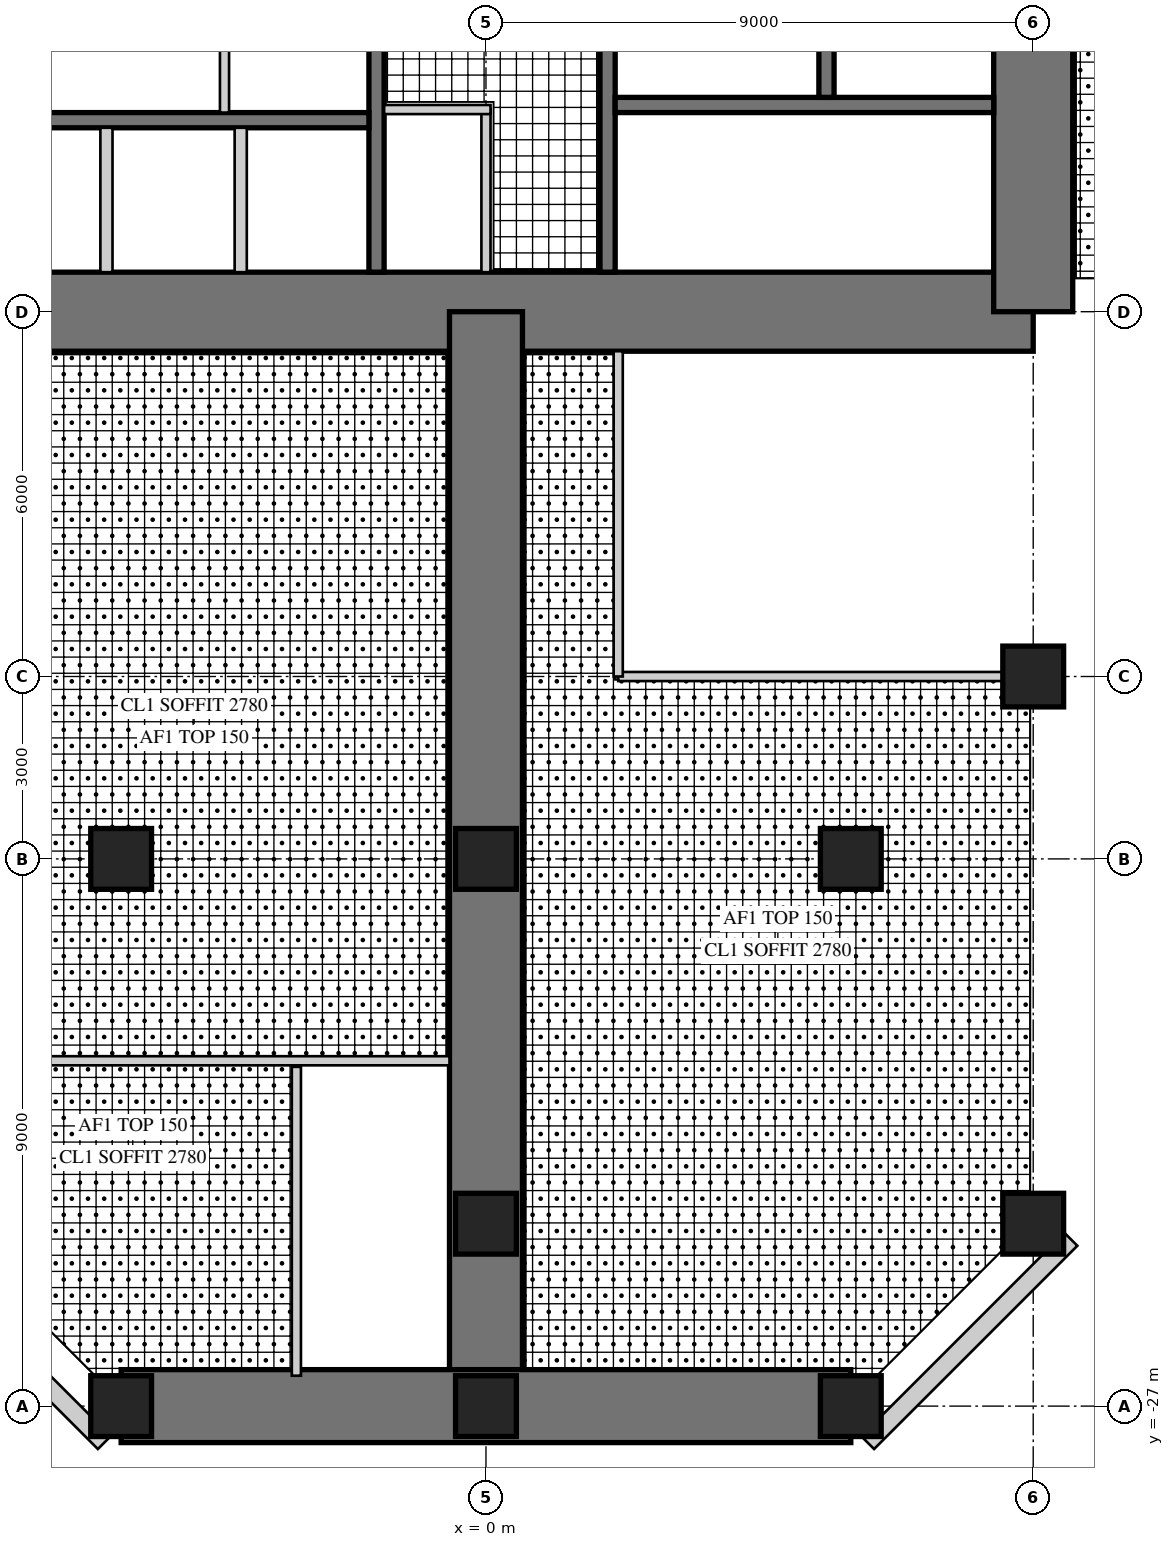
"""IFC4 building model, lengths in metres.
Left out: names, types, materials, properties, quantities, classifications, styles, units other than length and angle.
Written with IfcOpenShell. Run it as: python <this file> out.ifc"""

import sys

from ifc_helpers import new_model, si_unit, direction, frame, frame_2d, origin, origin_2d, place, context, subcontext, project, spatial, rectangle, hollow_rectangle, extrude, element, fill, save


model = new_model("IFC4")
c1 = context("Model", 3, precision=1e-05, world=origin(), true_north=direction((0.0, 1.0)))
c2 = subcontext(c1, "Body", "Model", "MODEL_VIEW")
j1 = project(units=[si_unit("LENGTHUNIT", "METRE"), si_unit("PLANEANGLEUNIT", "RADIAN")], contexts=[c1])
p1 = place(None, origin())
s1 = spatial("IfcSite", under=j1, at=p1, CompositionType="ELEMENT")
p2 = place(p1, origin())
s2 = spatial("IfcBuilding", under=s1, at=p2, CompositionType="ELEMENT")
p3 = place(p2, frame((0.0, 0.0, 104.5)))
s3 = spatial("IfcBuildingStorey", under=s2, at=p3, CompositionType="ELEMENT", Elevation=104.5)
p4 = place(p3, frame((-9.0, -9.0, 0.0), z_axis=(0.0, 0.0, 1.0), x_axis=(1.0, 0.0, 0.0)))
e1 = element("IfcWall", 1, at=p4, inside=s3, PredefinedType="SHEAR", context=c2, shape_type="SweptSolid", body=[
    extrude(rectangle(XDim=18.0, YDim=1.3, at=frame_2d((9.0, 0.0))), origin(), (0.0, 0.0, 1.0), 4.0),
])
p5 = place(p4, frame((9.8, 0.0, 0.0)))
e2 = element("IfcOpeningElement", 2, at=p5, cuts=e1, PredefinedType="OPENING", context=c2, shape_type="SweptSolid", body=[
    extrude(rectangle(XDim=1.0, YDim=2.4, at=frame_2d((0.5, 1.2))), frame((0.0, 0.66, 0.0), z_axis=(0.0, -1.0, 0.0), x_axis=(1.0, 0.0, 0.0)), (0.0, 0.0, 1.0), 1.32),
])
p6 = place(p3, frame((9.0, -9.0, 0.0), z_axis=(0.0, 0.0, 1.0), x_axis=(0.0, 1.0, 0.0)))
e3 = element("IfcWall", 3, at=p6, inside=s3, PredefinedType="SHEAR", context=c2, shape_type="SweptSolid", body=[
    extrude(rectangle(XDim=18.0, YDim=1.3, at=frame_2d((9.0, 0.0))), origin(), (0.0, 0.0, 1.0), 4.0),
])
p7 = place(p6, frame((9.8, 0.0, 0.0)))
e4 = element("IfcOpeningElement", 4, at=p7, cuts=e3, PredefinedType="OPENING", context=c2, shape_type="SweptSolid", body=[
    extrude(rectangle(XDim=1.0, YDim=2.4, at=frame_2d((0.5, 1.2))), frame((0.0, 0.66, 0.0), z_axis=(0.0, -1.0, 0.0), x_axis=(1.0, 0.0, 0.0)), (0.0, 0.0, 1.0), 1.32),
])
p8 = place(p3, frame((-1.8, -1.875, 0.0), z_axis=(0.0, 0.0, 1.0), x_axis=(0.0, -1.0, 0.0)))
e5 = element("IfcWall", 5, at=p8, inside=s3, PredefinedType="SHEAR", context=c2, shape_type="SweptSolid", body=[
    extrude(rectangle(XDim=6.475, YDim=0.25, at=frame_2d((3.238, 0.0))), origin(), (0.0, 0.0, 1.0), 4.0),
])
p9 = place(p8, frame((1.875, 0.0, 0.0)))
e6 = element("IfcOpeningElement", 6, at=p9, cuts=e5, PredefinedType="OPENING", context=c2, shape_type="SweptSolid", body=[
    extrude(rectangle(XDim=1.6, YDim=2.4, at=frame_2d((0.8, 1.2))), frame((0.0, 0.135, 0.0), z_axis=(0.0, -1.0, 0.0), x_axis=(1.0, 0.0, 0.0)), (0.0, 0.0, 1.0), 0.27),
])
p10 = place(p3, frame((-1.925, -5.85, 0.0), z_axis=(0.0, 0.0, 1.0), x_axis=(-1.0, 0.0, 0.0)))
e7 = element("IfcWall", 7, at=p10, inside=s3, PredefinedType="SHEAR", context=c2, shape_type="SweptSolid", body=[
    extrude(rectangle(XDim=6.425, YDim=0.25, at=frame_2d((3.212, 0.0))), origin(), (0.0, 0.0, 1.0), 4.0),
])
for number, where, z_axis, x_axis in (
    (8, (-4.033, -5.975, 0.0), (0.0, 0.0, 1.0), (0.0, -1.0, 0.0)),
    (9, (-6.242, -5.975, 0.0), (0.0, 0.0, 1.0), (0.0, -1.0, 0.0)),
):
    element("IfcWall", number, at=place(p3, frame(where, z_axis=z_axis, x_axis=x_axis)), inside=s3, PredefinedType="PARTITIONING", context=c2, shape_type="SweptSolid", body=[
        extrude(rectangle(XDim=2.375, YDim=0.2, at=frame_2d((1.188, 0.0))), origin(), (0.0, 0.0, 1.0), 4.0),
    ])
p11 = place(p3, frame((2.0, -1.675, 0.0), z_axis=(0.0, 0.0, 1.0), x_axis=(0.0, -1.0, 0.0)))
e10 = element("IfcWall", 10, at=p11, inside=s3, PredefinedType="SHEAR", context=c2, shape_type="SweptSolid", body=[
    extrude(rectangle(XDim=6.675, YDim=0.25, at=frame_2d((3.337, 0.0))), origin(), (0.0, 0.0, 1.0), 4.0),
])
p12 = place(p11, frame((0.725, 0.0, 0.0)))
e11 = element("IfcOpeningElement", 11, at=p12, cuts=e10, PredefinedType="OPENING", context=c2, shape_type="SweptSolid", body=[
    extrude(rectangle(XDim=1.0, YDim=2.1, at=frame_2d((0.5, 1.05))), frame((0.0, 0.135, 0.0), z_axis=(0.0, -1.0, 0.0), x_axis=(1.0, 0.0, 0.0)), (0.0, 0.0, 1.0), 0.27),
])
p13 = place(p3, frame((2.125, -5.6, 0.0), z_axis=(0.0, 0.0, 1.0), x_axis=(1.0, 0.0, 0.0)))
e12 = element("IfcWall", 12, at=p13, inside=s3, PredefinedType="SHEAR", context=c2, shape_type="SweptSolid", body=[
    extrude(rectangle(XDim=6.225, YDim=0.25, at=frame_2d((3.113, 0.0))), origin(), (0.0, 0.0, 1.0), 4.0),
])
p14 = place(p13, frame((0.175, 0.0, 0.0)))
e13 = element("IfcOpeningElement", 13, at=p14, cuts=e12, PredefinedType="OPENING", context=c2, shape_type="SweptSolid", body=[
    extrude(rectangle(XDim=1.0, YDim=2.1, at=frame_2d((0.5, 1.05))), frame((0.0, 0.135, 0.0), z_axis=(0.0, -1.0, 0.0), x_axis=(1.0, 0.0, 0.0)), (0.0, 0.0, 1.0), 0.27),
])
p15 = place(p3, frame((5.6, -1.925, 0.0), z_axis=(0.0, 0.0, 1.0), x_axis=(0.0, -1.0, 0.0)))
e14 = element("IfcWall", 14, at=p15, inside=s3, PredefinedType="SHEAR", context=c2, shape_type="SweptSolid", body=[
    extrude(rectangle(XDim=3.55, YDim=0.25, at=frame_2d((1.775, 0.0))), origin(), (0.0, 0.0, 1.0), 4.0),
])
p16 = place(p15, frame((1.525, 0.0, 0.0)))
e15 = element("IfcOpeningElement", 15, at=p16, cuts=e14, PredefinedType="OPENING", context=c2, shape_type="SweptSolid", body=[
    extrude(rectangle(XDim=1.1, YDim=2.2, at=frame_2d((0.55, 1.1))), frame((0.0, 0.135, 0.0), z_axis=(0.0, -1.0, 0.0), x_axis=(1.0, 0.0, 0.0)), (0.0, 0.0, 1.0), 0.27),
])
p17 = place(p15, frame((0.075, 0.0, 0.0)))
e16 = element("IfcOpeningElement", 16, at=p17, cuts=e14, PredefinedType="OPENING", context=c2, shape_type="SweptSolid", body=[
    extrude(rectangle(XDim=0.8, YDim=2.1, at=frame_2d((0.4, 1.05))), frame((0.0, 0.135, 0.0), z_axis=(0.0, -1.0, 0.0), x_axis=(1.0, 0.0, 0.0)), (0.0, 0.0, 1.0), 0.27),
])
p18 = place(p3, frame((0.0, -9.0, 0.0), z_axis=(0.0, 0.0, 1.0), x_axis=(0.0, -1.0, 0.0)))
e17 = element("IfcWall", 17, at=p18, inside=s3, PredefinedType="SHEAR", context=c2, shape_type="SweptSolid", body=[
    extrude(rectangle(XDim=18.0, YDim=1.2, at=frame_2d((9.0, 0.0))), origin(), (0.0, 0.0, 1.0), 4.0),
])
p19 = place(p18, frame((9.8, 0.0, 0.0)))
e18 = element("IfcOpeningElement", 18, at=p19, cuts=e17, PredefinedType="OPENING", context=c2, shape_type="SweptSolid", body=[
    extrude(rectangle(XDim=1.0, YDim=2.2, at=frame_2d((0.5, 1.1))), frame((0.0, 0.61, 0.0), z_axis=(0.0, -1.0, 0.0), x_axis=(1.0, 0.0, 0.0)), (0.0, 0.0, 1.0), 1.22),
])
p20 = place(p3, frame((-6.0, -27.0, 0.0), z_axis=(0.0, 0.0, 1.0), x_axis=(1.0, 0.0, 0.0)))
e19 = element("IfcWall", 19, at=p20, inside=s3, PredefinedType="SHEAR", context=c2, shape_type="SweptSolid", body=[
    extrude(rectangle(XDim=12.0, YDim=1.2, at=frame_2d((6.0, 0.0))), origin(), (0.0, 0.0, 1.0), 4.0),
])
p21 = place(p20, frame((1.55, 0.0, 0.6)))
e20 = element("IfcOpeningElement", 20, at=p21, cuts=e19, PredefinedType="OPENING", context=c2, shape_type="SweptSolid", body=[
    extrude(rectangle(XDim=3.0, YDim=2.4, at=frame_2d((1.5, 1.2))), frame((0.0, 0.61, 0.0), z_axis=(0.0, -1.0, 0.0), x_axis=(1.0, 0.0, 0.0)), (0.0, 0.0, 1.0), 1.22),
])
p22 = place(p20, frame((7.45, 0.0, 0.6)))
e21 = element("IfcOpeningElement", 21, at=p22, cuts=e19, PredefinedType="OPENING", context=c2, shape_type="SweptSolid", body=[
    extrude(rectangle(XDim=3.0, YDim=2.4, at=frame_2d((1.5, 1.2))), frame((0.0, 0.61, 0.0), z_axis=(0.0, -1.0, 0.0), x_axis=(1.0, 0.0, 0.0)), (0.0, 0.0, 1.0), 1.22),
])
for number, where, z_axis, x_axis in (
    (22, (9.0, -15.0, 0.0), (0.0, 0.0, 1.0), (1.0, 0.0, 0.0)),
    (23, (9.0, -24.0, 0.0), (0.0, 0.0, 1.0), (1.0, 0.0, 0.0)),
    (24, (-6.0, -27.0, 0.0), (0.0, 0.0, 1.0), (1.0, 0.0, 0.0)),
    (25, (0.0, -27.0, 0.0), (0.0, 0.0, 1.0), (1.0, 0.0, 0.0)),
    (26, (6.0, -27.0, 0.0), (0.0, 0.0, 1.0), (1.0, 0.0, 0.0)),
    (27, (-6.0, -18.0, 0.0), (0.0, 0.0, 1.0), (1.0, 0.0, 0.0)),
    (28, (0.0, -18.0, 0.0), (0.0, 0.0, 1.0), (1.0, 0.0, 0.0)),
    (29, (6.0, -18.0, 0.0), (0.0, 0.0, 1.0), (1.0, 0.0, 0.0)),
    (30, (0.0, -24.0, 0.0), (0.0, 0.0, 1.0), (1.0, 0.0, 0.0)),
):
    element("IfcColumn", number, at=place(p3, frame(where, z_axis=z_axis, x_axis=x_axis)), inside=s3, PredefinedType="COLUMN", context=c2, shape_type="SweptSolid", body=[
        extrude(rectangle(XDim=1.0, YDim=1.0, at=origin_2d()), origin(), (0.0, 0.0, 1.0), 4.0),
    ])
p23 = place(p3, frame((-9.62, -24.257, 0.0), z_axis=(0.0, 0.0, 1.0), x_axis=(0.707106781187, -0.707106781187, 0.0)))
e31 = element("IfcWall", 31, at=p23, inside=s3, PredefinedType="SOLIDWALL", context=c2, shape_type="SweptSolid", body=[
    extrude(rectangle(XDim=4.728, YDim=0.3, at=frame_2d((2.364, 0.0))), origin(), (0.0, 0.0, 1.0), 3.8),
])
p24 = place(p23, frame((1.914, 0.0, 0.3)))
e32 = element("IfcOpeningElement", 32, at=p24, cuts=e31, PredefinedType="OPENING", context=c2, shape_type="SweptSolid", body=[
    extrude(rectangle(XDim=0.9, YDim=2.4, at=frame_2d((0.45, 1.2))), frame((0.0, 0.16, 0.0), z_axis=(0.0, -1.0, 0.0), x_axis=(1.0, 0.0, 0.0)), (0.0, 0.0, 1.0), 0.32),
])
p25 = place(p3, frame((6.277, -27.6, 0.0), z_axis=(0.0, 0.0, 1.0), x_axis=(0.707106781187, 0.707106781187, 0.0)))
e33 = element("IfcWall", 33, at=p25, inside=s3, PredefinedType="SOLIDWALL", context=c2, shape_type="SweptSolid", body=[
    extrude(rectangle(XDim=4.728, YDim=0.3, at=frame_2d((2.364, 0.0))), origin(), (0.0, 0.0, 1.0), 3.8),
])
p26 = place(p25, frame((1.914, 0.0, 0.3)))
e34 = element("IfcOpeningElement", 34, at=p26, cuts=e33, PredefinedType="OPENING", context=c2, shape_type="SweptSolid", body=[
    extrude(rectangle(XDim=0.9, YDim=2.4, at=frame_2d((0.45, 1.2))), frame((0.0, 0.16, 0.0), z_axis=(0.0, -1.0, 0.0), x_axis=(1.0, 0.0, 0.0)), (0.0, 0.0, 1.0), 0.32),
])
p27 = place(p3, frame((0.0, -5.675, 0.0), z_axis=(0.0, 0.0, 1.0), x_axis=(0.0, -1.0, 0.0)))
e35 = element("IfcWall", 35, at=p27, inside=s3, PredefinedType="PARTITIONING", context=c2, shape_type="SweptSolid", body=[
    extrude(rectangle(XDim=2.675, YDim=0.15, at=frame_2d((1.337, 0.0))), origin(), (0.0, 0.0, 1.0), 3.8),
])
p28 = place(p27, frame((0.4, 0.0, 0.0)))
e36 = element("IfcOpeningElement", 36, at=p28, cuts=e35, PredefinedType="OPENING", context=c2, shape_type="SweptSolid", body=[
    extrude(rectangle(XDim=1.0, YDim=2.1, at=frame_2d((0.5, 1.05))), frame((0.0, 0.085, 0.0), z_axis=(0.0, -1.0, 0.0), x_axis=(1.0, 0.0, 0.0)), (0.0, 0.0, 1.0), 0.17),
])
p29 = place(p3, frame((-1.675, -5.675, 0.0), z_axis=(0.0, 0.0, 1.0), x_axis=(1.0, 0.0, 0.0)))
e37 = element("IfcWall", 37, at=p29, inside=s3, PredefinedType="PARTITIONING", context=c2, shape_type="SweptSolid", body=[
    extrude(rectangle(XDim=1.75, YDim=0.15, at=frame_2d((0.875, 0.0))), origin(), (0.0, 0.0, 1.0), 3.8),
])
p30 = place(p3, frame((-4.3, -3.375, 0.0), z_axis=(0.0, 0.0, 1.0), x_axis=(0.0, -1.0, 0.0)))
e38 = element("IfcWall", 38, at=p30, inside=s3, PredefinedType="PARTITIONING", context=c2, shape_type="SweptSolid", body=[
    extrude(rectangle(XDim=2.35, YDim=0.15, at=frame_2d((1.175, 0.0))), origin(), (0.0, 0.0, 1.0), 3.8),
])
p31 = place(p30, frame((0.45, 0.0, 0.0)))
e39 = element("IfcOpeningElement", 39, at=p31, cuts=e38, PredefinedType="OPENING", context=c2, shape_type="SweptSolid", body=[
    extrude(rectangle(XDim=1.0, YDim=2.1, at=frame_2d((0.5, 1.05))), frame((0.0, 0.085, 0.0), z_axis=(0.0, -1.0, 0.0), x_axis=(1.0, 0.0, 0.0)), (0.0, 0.0, 1.0), 0.17),
])
p32 = place(p3, frame((2.175, -15.0, 0.0), z_axis=(0.0, 0.0, 1.0), x_axis=(1.0, 0.0, 0.0)))
e40 = element("IfcWall", 40, at=p32, inside=s3, PredefinedType="PARTITIONING", context=c2, shape_type="SweptSolid", body=[
    extrude(rectangle(XDim=6.325, YDim=0.15, at=frame_2d((3.163, 0.0))), origin(), (0.0, 0.0, 1.0), 3.0),
])
p33 = place(p32, frame((2.663, 0.0, 0.0)))
e41 = element("IfcOpeningElement", 41, at=p33, cuts=e40, PredefinedType="OPENING", context=c2, shape_type="SweptSolid", body=[
    extrude(rectangle(XDim=1.0, YDim=2.1, at=frame_2d((0.5, 1.05))), frame((0.0, 0.085, 0.0), z_axis=(0.0, -1.0, 0.0), x_axis=(1.0, 0.0, 0.0)), (0.0, 0.0, 1.0), 0.17),
])
p34 = place(p3, frame((2.175, -9.65, 0.0), z_axis=(0.0, 0.0, 1.0), x_axis=(0.0, -1.0, 0.0)))
e42 = element("IfcWall", 42, at=p34, inside=s3, PredefinedType="PARTITIONING", context=c2, shape_type="SweptSolid", body=[
    extrude(rectangle(XDim=5.35, YDim=0.15, at=frame_2d((2.675, 0.0))), origin(), (0.0, 0.0, 1.0), 3.8),
])
p35 = place(p3, frame((-3.118, -21.42, 0.0), z_axis=(0.0, 0.0, 1.0), x_axis=(0.0, -1.0, 0.0)))
e43 = element("IfcWall", 43, at=p35, inside=s3, PredefinedType="PARTITIONING", context=c2, shape_type="SweptSolid", body=[
    extrude(rectangle(XDim=5.08, YDim=0.15, at=frame_2d((2.54, 0.0))), origin(), (0.0, 0.0, 1.0), 3.8),
])
p36 = place(p3, frame((-9.58, -21.32, 0.0), z_axis=(0.0, 0.0, 1.0), x_axis=(1.0, 0.0, 0.0)))
e44 = element("IfcWall", 44, at=p36, inside=s3, PredefinedType="PARTITIONING", context=c2, shape_type="SweptSolid", body=[
    extrude(rectangle(XDim=8.98, YDim=0.15, at=frame_2d((4.49, 0.0))), origin(), (0.0, 0.0, 1.0), 3.8),
])
p37 = place(p36, frame((4.987, 0.0, 0.0)))
e45 = element("IfcOpeningElement", 45, at=p37, cuts=e44, PredefinedType="OPENING", context=c2, shape_type="SweptSolid", body=[
    extrude(rectangle(XDim=1.0, YDim=2.2, at=frame_2d((0.5, 1.1))), frame((0.0, 0.085, 0.0), z_axis=(0.0, -1.0, 0.0), x_axis=(1.0, 0.0, 0.0)), (0.0, 0.0, 1.0), 0.17),
])
p38 = place(p36, frame((7.63, 0.0, 0.0)))
e46 = element("IfcOpeningElement", 46, at=p38, cuts=e44, PredefinedType="OPENING", context=c2, shape_type="SweptSolid", body=[
    extrude(rectangle(XDim=1.0, YDim=2.2, at=frame_2d((0.5, 1.1))), frame((0.0, 0.085, 0.0), z_axis=(0.0, -1.0, 0.0), x_axis=(1.0, 0.0, 0.0)), (0.0, 0.0, 1.0), 0.17),
])
p39 = place(p21, origin())
e47 = element("IfcWindow", 47, at=p39, inside=s3, PartitioningType="SINGLE_PANEL", PredefinedType="WINDOW", context=c2, shape_type="SweptSolid", body=[
    extrude(hollow_rectangle(XDim=3.0, YDim=2.4, WallThickness=0.06, at=frame_2d((1.5, 1.2))), frame((0.0, 0.03, 0.0), z_axis=(0.0, -1.0, 0.0), x_axis=(1.0, 0.0, 0.0)), (0.0, 0.0, 1.0), 0.06),
    extrude(rectangle(XDim=2.879, YDim=2.279, at=frame_2d((1.5, 1.2))), frame((0.0, 0.03, 0.0), z_axis=(0.0, -1.0, 0.0), x_axis=(1.0, 0.0, 0.0)), (0.0, 0.0, 1.0), 0.06),
])
fill(e20, e47)
p40 = place(p22, origin())
e48 = element("IfcWindow", 48, at=p40, inside=s3, PartitioningType="SINGLE_PANEL", PredefinedType="WINDOW", context=c2, shape_type="SweptSolid", body=[
    extrude(hollow_rectangle(XDim=3.0, YDim=2.4, WallThickness=0.06, at=frame_2d((1.5, 1.2))), frame((0.0, 0.03, 0.0), z_axis=(0.0, -1.0, 0.0), x_axis=(1.0, 0.0, 0.0)), (0.0, 0.0, 1.0), 0.06),
    extrude(rectangle(XDim=2.879, YDim=2.279, at=frame_2d((1.5, 1.2))), frame((0.0, 0.03, 0.0), z_axis=(0.0, -1.0, 0.0), x_axis=(1.0, 0.0, 0.0)), (0.0, 0.0, 1.0), 0.06),
])
fill(e21, e48)
p41 = place(p26, origin())
e49 = element("IfcWindow", 49, at=p41, inside=s3, PartitioningType="SINGLE_PANEL", PredefinedType="WINDOW", context=c2, shape_type="SweptSolid", body=[
    extrude(hollow_rectangle(XDim=0.9, YDim=2.4, WallThickness=0.06, at=frame_2d((0.45, 1.2))), frame((0.0, 0.03, 0.0), z_axis=(0.0, -1.0, 0.0), x_axis=(1.0, 0.0, 0.0)), (0.0, 0.0, 1.0), 0.06),
    extrude(rectangle(XDim=0.779, YDim=2.279, at=frame_2d((0.45, 1.2))), frame((0.0, 0.03, 0.0), z_axis=(0.0, -1.0, 0.0), x_axis=(1.0, 0.0, 0.0)), (0.0, 0.0, 1.0), 0.06),
])
fill(e34, e49)
p42 = place(p28, frame((1.0, 0.0, 0.0), z_axis=(0.0, 0.0, 1.0), x_axis=(-1.0, 0.0, 0.0)))
e50 = element("IfcDoor", 50, at=p42, inside=s3, OperationType="SINGLE_SWING_RIGHT", PredefinedType="DOOR", context=c2, shape_type="SweptSolid", body=[
    extrude(rectangle(XDim=1.0, YDim=2.1, at=frame_2d((0.5, 1.05))), frame((0.0, 0.025, 0.0), z_axis=(0.0, -1.0, 0.0), x_axis=(1.0, 0.0, 0.0)), (0.0, 0.0, 1.0), 0.05),
])
fill(e36, e50)
p43 = place(p31, origin())
e51 = element("IfcDoor", 51, at=p43, inside=s3, OperationType="SINGLE_SWING_LEFT", PredefinedType="DOOR", context=c2, shape_type="SweptSolid", body=[
    extrude(rectangle(XDim=1.0, YDim=2.1, at=frame_2d((0.5, 1.05))), frame((0.0, 0.025, 0.0), z_axis=(0.0, -1.0, 0.0), x_axis=(1.0, 0.0, 0.0)), (0.0, 0.0, 1.0), 0.05),
])
fill(e39, e51)
p44 = place(p33, origin())
e52 = element("IfcDoor", 52, at=p44, inside=s3, OperationType="SINGLE_SWING_LEFT", PredefinedType="DOOR", context=c2, shape_type="SweptSolid", body=[
    extrude(rectangle(XDim=1.0, YDim=2.1, at=frame_2d((0.5, 1.05))), frame((0.0, 0.025, 0.0), z_axis=(0.0, -1.0, 0.0), x_axis=(1.0, 0.0, 0.0)), (0.0, 0.0, 1.0), 0.05),
])
fill(e41, e52)
p45 = place(p37, frame((1.0, 0.0, 0.0), z_axis=(0.0, 0.0, 1.0), x_axis=(-1.0, 0.0, 0.0)))
e53 = element("IfcDoor", 53, at=p45, inside=s3, OperationType="SINGLE_SWING_LEFT", PredefinedType="DOOR", context=c2, shape_type="SweptSolid", body=[
    extrude(rectangle(XDim=1.0, YDim=2.2, at=frame_2d((0.5, 1.1))), frame((0.0, 0.025, 0.0), z_axis=(0.0, -1.0, 0.0), x_axis=(1.0, 0.0, 0.0)), (0.0, 0.0, 1.0), 0.05),
])
fill(e45, e53)
p46 = place(p38, frame((1.0, 0.0, 0.0), z_axis=(0.0, 0.0, 1.0), x_axis=(-1.0, 0.0, 0.0)))
e54 = element("IfcDoor", 54, at=p46, inside=s3, OperationType="SINGLE_SWING_LEFT", PredefinedType="DOOR", context=c2, shape_type="SweptSolid", body=[
    extrude(rectangle(XDim=1.0, YDim=2.2, at=frame_2d((0.5, 1.1))), frame((0.0, 0.025, 0.0), z_axis=(0.0, -1.0, 0.0), x_axis=(1.0, 0.0, 0.0)), (0.0, 0.0, 1.0), 0.05),
])
fill(e46, e54)
p47 = place(p19, frame((1.0, 0.0, 0.0), z_axis=(0.0, 0.0, 1.0), x_axis=(-1.0, 0.0, 0.0)))
e55 = element("IfcDoor", 55, at=p47, inside=s3, OperationType="SINGLE_SWING_LEFT", PredefinedType="DOOR", context=c2, shape_type="SweptSolid", body=[
    extrude(rectangle(XDim=1.0, YDim=2.2, at=frame_2d((0.5, 1.1))), frame((0.0, 0.025, 0.0), z_axis=(0.0, -1.0, 0.0), x_axis=(1.0, 0.0, 0.0)), (0.0, 0.0, 1.0), 0.05),
])
fill(e18, e55)
p48 = place(p5, frame((1.0, 0.0, 0.0), z_axis=(0.0, 0.0, 1.0), x_axis=(-1.0, 0.0, 0.0)))
e56 = element("IfcDoor", 56, at=p48, inside=s3, OperationType="SINGLE_SWING_RIGHT", PredefinedType="DOOR", context=c2, shape_type="SweptSolid", body=[
    extrude(rectangle(XDim=1.0, YDim=2.4, at=frame_2d((0.5, 1.2))), frame((0.0, -0.005, 0.0), z_axis=(0.0, -1.0, 0.0), x_axis=(1.0, 0.0, 0.0)), (0.0, 0.0, 1.0), 0.05),
])
fill(e2, e56)
p49 = place(p9, frame((1.6, 0.0, 0.0), z_axis=(0.0, 0.0, 1.0), x_axis=(-1.0, 0.0, 0.0)))
e57 = element("IfcDoor", 57, at=p49, inside=s3, OperationType="DOUBLE_DOOR_SINGLE_SWING", PredefinedType="DOOR", context=c2, shape_type="SweptSolid", body=[
    extrude(rectangle(XDim=1.6, YDim=2.4, at=frame_2d((0.8, 1.2))), frame((0.0, 0.025, 0.0), z_axis=(0.0, -1.0, 0.0), x_axis=(1.0, 0.0, 0.0)), (0.0, 0.0, 1.0), 0.05),
])
fill(e6, e57)
p50 = place(p14, frame((1.0, 0.0, 0.0), z_axis=(0.0, 0.0, 1.0), x_axis=(-1.0, 0.0, 0.0)))
e58 = element("IfcDoor", 58, at=p50, inside=s3, OperationType="SINGLE_SWING_RIGHT", PredefinedType="DOOR", context=c2, shape_type="SweptSolid", body=[
    extrude(rectangle(XDim=1.0, YDim=2.1, at=frame_2d((0.5, 1.05))), frame((0.0, 0.025, 0.0), z_axis=(0.0, -1.0, 0.0), x_axis=(1.0, 0.0, 0.0)), (0.0, 0.0, 1.0), 0.05),
])
fill(e13, e58)
save(model, sys.argv[1])
